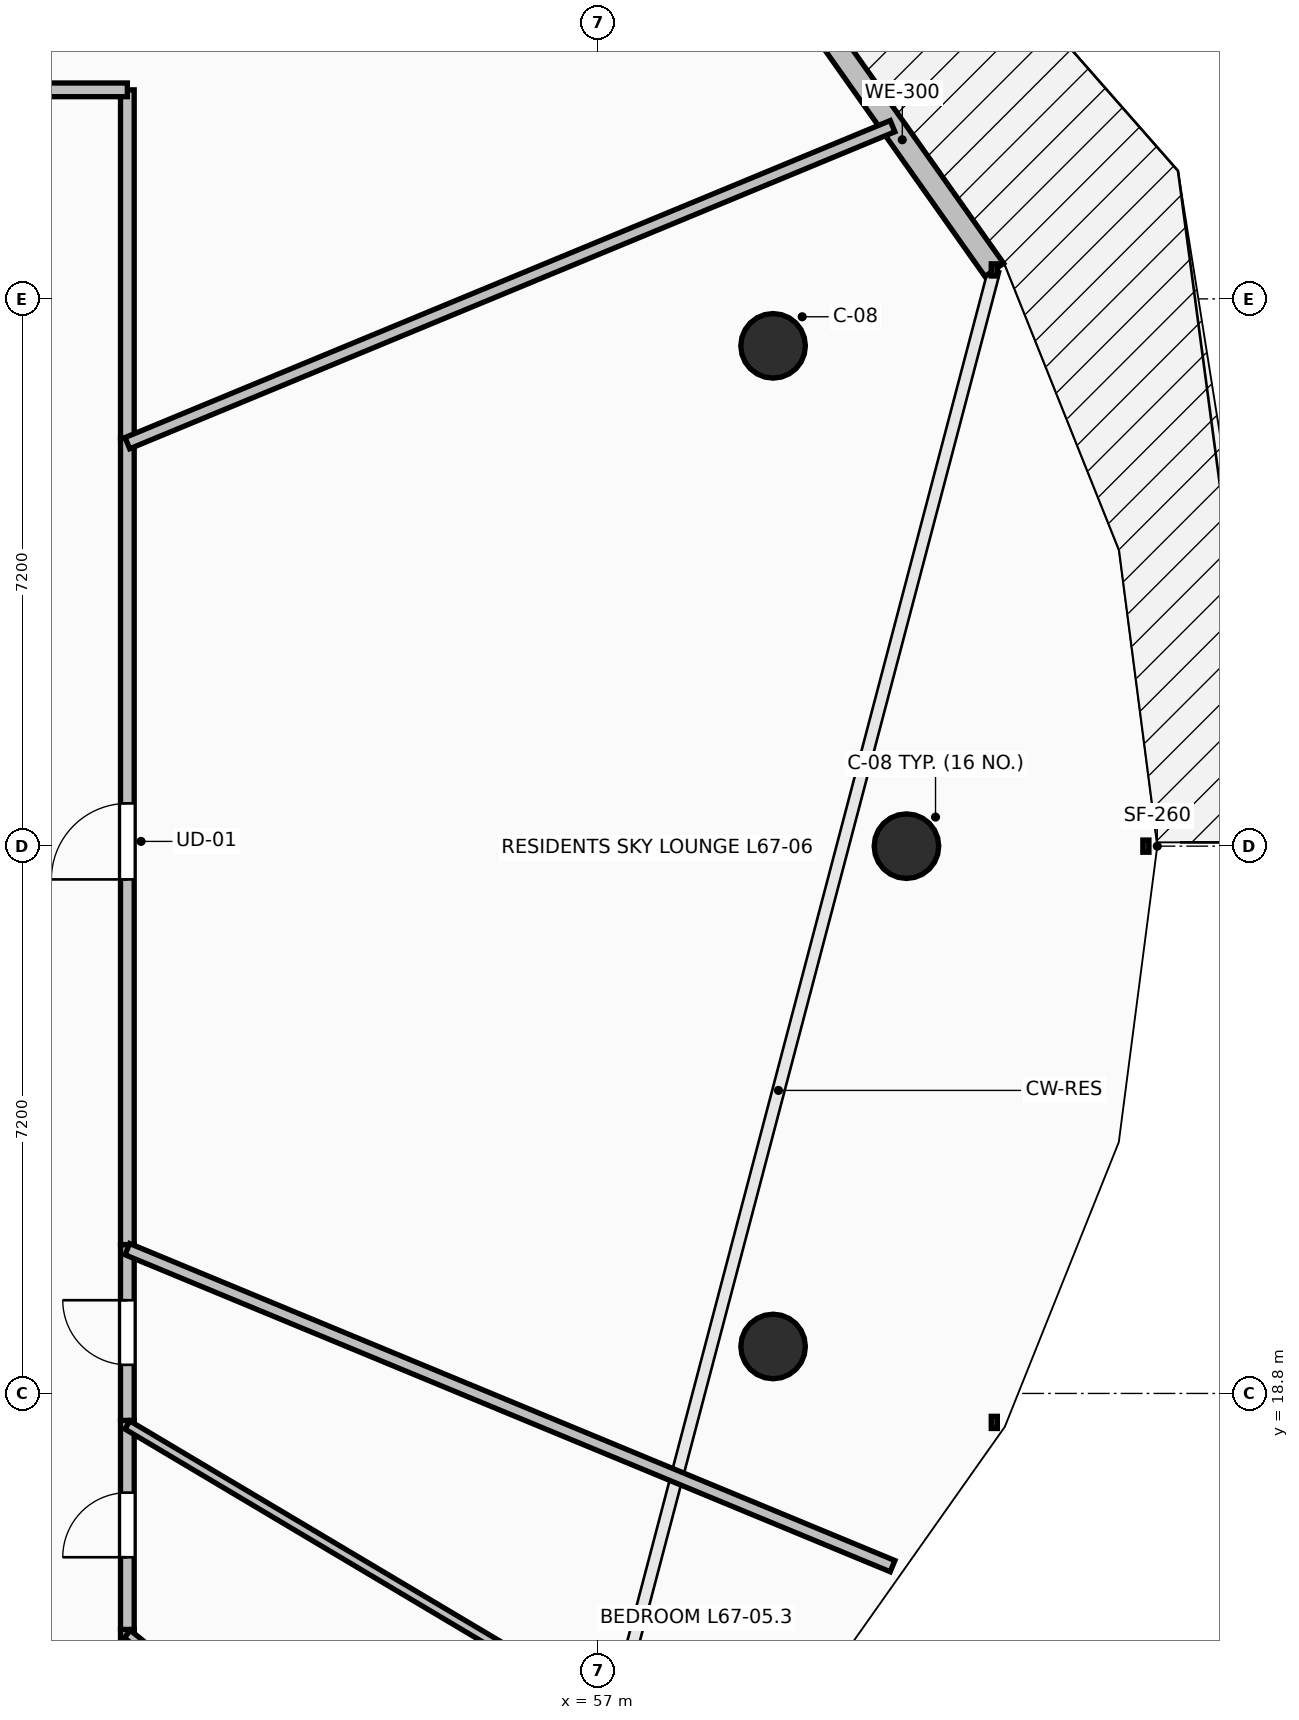
"""IFC4 building model, lengths in metres.
Left out: names, types, materials, properties, quantities, classifications, styles, units other than length and angle.
Written with IfcOpenShell. Run it as: python <this file> out.ifc"""

import sys

from ifc_helpers import new_model, si_unit, direction, frame, frame_2d, origin, origin_2d, place, context, subcontext, project, spatial, rectangle, circle, extrude, element, fill, save


model = new_model("IFC4")
c1 = context("Model", 3, precision=1e-05, world=origin(), true_north=direction((0.0, 1.0)))
c2 = subcontext(c1, "Body", "Model", "MODEL_VIEW")
j1 = project(units=[si_unit("LENGTHUNIT", "METRE"), si_unit("PLANEANGLEUNIT", "RADIAN")], contexts=[c1])
p1 = place(None, origin())
s1 = spatial("IfcSite", under=j1, at=p1, CompositionType="ELEMENT")
p2 = place(p1, origin())
s2 = spatial("IfcBuilding", under=s1, at=p2, CompositionType="ELEMENT")
p3 = place(p2, frame((0.0, 0.0, 248.45)))
s3 = spatial("IfcBuildingStorey", under=s2, at=p3, CompositionType="ELEMENT", Elevation=248.45)
for number, where, z_axis, x_axis in (
    (1, (61.05, 26.0, 0.0), (0.0, 0.0, 1.0), (1.0, 0.0, 0.0)),
    (2, (59.295, 32.582, 0.0), (0.0, 0.0, 1.0), (0.924, 0.383, 0.0)),
    (3, (59.295, 19.418, 0.0), (0.0, 0.0, 1.0), (0.924, -0.383, 0.0)),
):
    element("IfcColumn", number, at=place(p3, frame(where, z_axis=z_axis, x_axis=x_axis)), inside=s3, PredefinedType="COLUMN", context=c2, shape_type="SweptSolid", body=[
        extrude(circle(Radius=0.425, at=origin_2d()), origin(), (0.0, 0.0, 1.0), 3.55),
    ])
p4 = place(p3, frame((62.206, 33.581, 0.0), z_axis=(0.0, 0.0, 1.0), x_axis=(-0.577261247247, 0.816559521668, 0.0)))
e4 = element("IfcWall", 4, at=p4, inside=s3, PredefinedType="STANDARD", context=c2, shape_type="SweptSolid", body=[
    extrude(rectangle(XDim=4.194, YDim=0.3, at=frame_2d((2.097, 0.0))), origin(), (0.0, 0.0, 1.0), 3.29),
])
p5 = place(p3, frame((50.8, 14.05, 0.0), z_axis=(0.0, 0.0, 1.0), x_axis=(0.0, 1.0, 0.0)))
e5 = element("IfcWall", 5, at=p5, inside=s3, PredefinedType="PARTITIONING", context=c2, shape_type="SweptSolid", body=[
    extrude(rectangle(XDim=1.645, YDim=0.18, at=frame_2d((0.823, 0.0))), origin(), (0.0, 0.0, 1.0), 2.482),
])
p6 = place(p3, frame((50.8, 15.695, 0.0), z_axis=(0.0, 0.0, 1.0), x_axis=(0.0, 1.0, 0.0)))
e6 = element("IfcWall", 6, at=p6, inside=s3, PredefinedType="PARTITIONING", context=c2, shape_type="SweptSolid", body=[
    extrude(rectangle(XDim=2.75, YDim=0.18, at=frame_2d((1.375, 0.0))), origin(), (0.0, 0.0, 1.0), 2.482),
])
p7 = place(p6, frame((0.95, 0.0, 0.0)))
e7 = element("IfcOpeningElement", 7, at=p7, cuts=e6, PredefinedType="OPENING", context=c2, shape_type="SweptSolid", body=[
    extrude(rectangle(XDim=0.85, YDim=2.1, at=frame_2d((0.425, 1.05))), frame((0.0, 0.105, 0.0), z_axis=(0.0, -1.0, 0.0), x_axis=(1.0, 0.0, 0.0)), (0.0, 0.0, 1.0), 0.21),
])
p8 = place(p3, frame((50.8, 18.445, 0.0), z_axis=(0.0, 0.0, 1.0), x_axis=(0.0, 1.0, 0.0)))
e8 = element("IfcWall", 8, at=p8, inside=s3, PredefinedType="PARTITIONING", context=c2, shape_type="SweptSolid", body=[
    extrude(rectangle(XDim=2.313, YDim=0.18, at=frame_2d((1.156, 0.0))), origin(), (0.0, 0.0, 1.0), 3.022),
])
p9 = place(p8, frame((0.731, 0.0, 0.0)))
e9 = element("IfcOpeningElement", 9, at=p9, cuts=e8, PredefinedType="OPENING", context=c2, shape_type="SweptSolid", body=[
    extrude(rectangle(XDim=0.85, YDim=2.1, at=frame_2d((0.425, 1.05))), frame((0.0, 0.105, 0.0), z_axis=(0.0, -1.0, 0.0), x_axis=(1.0, 0.0, 0.0)), (0.0, 0.0, 1.0), 0.21),
])
p10 = place(p3, frame((50.8, 20.758, 0.0), z_axis=(0.0, 0.0, 1.0), x_axis=(0.0, 1.0, 0.0)))
e10 = element("IfcWall", 10, at=p10, inside=s3, PredefinedType="PARTITIONING", context=c2, shape_type="SweptSolid", body=[
    extrude(rectangle(XDim=10.609, YDim=0.18, at=frame_2d((5.304, 0.0))), origin(), (0.0, 0.0, 1.0), 2.482),
])
p11 = place(p10, frame((4.804, 0.0, 0.0)))
e11 = element("IfcOpeningElement", 11, at=p11, cuts=e10, PredefinedType="OPENING", context=c2, shape_type="SweptSolid", body=[
    extrude(rectangle(XDim=1.0, YDim=2.15, at=frame_2d((0.5, 1.075))), frame((0.0, 0.105, 0.0), z_axis=(0.0, -1.0, 0.0), x_axis=(1.0, 0.0, 0.0)), (0.0, 0.0, 1.0), 0.21),
])
p12 = place(p3, frame((50.8, 31.367, 0.0), z_axis=(0.0, 0.0, 1.0), x_axis=(0.0, 1.0, 0.0)))
e12 = element("IfcWall", 12, at=p12, inside=s3, PredefinedType="PARTITIONING", context=c2, shape_type="SweptSolid", body=[
    extrude(rectangle(XDim=4.583, YDim=0.18, at=frame_2d((2.292, 0.0))), origin(), (0.0, 0.0, 1.0), 2.482),
])
p13 = place(p3, frame((50.8, 35.95, 0.0), z_axis=(0.0, 0.0, 1.0), x_axis=(-1.0, 0.0, 0.0)))
e13 = element("IfcWall", 13, at=p13, inside=s3, PredefinedType="PARTITIONING", context=c2, shape_type="SweptSolid", body=[
    extrude(rectangle(XDim=8.739, YDim=0.18, at=frame_2d((4.37, 0.0))), origin(), (0.0, 0.0, 1.0), 2.482),
])
p14 = place(p13, frame((3.869, 0.0, 0.0)))
e14 = element("IfcOpeningElement", 14, at=p14, cuts=e13, PredefinedType="OPENING", context=c2, shape_type="SweptSolid", body=[
    extrude(rectangle(XDim=1.0, YDim=2.15, at=frame_2d((0.5, 1.075))), frame((0.0, 0.105, 0.0), z_axis=(0.0, -1.0, 0.0), x_axis=(1.0, 0.0, 0.0)), (0.0, 0.0, 1.0), 0.21),
])
p15 = place(p3, frame((55.828, 11.563, 0.0), z_axis=(0.0, 0.0, 1.0), x_axis=(-0.777103372697, 0.62937298015, 0.0)))
e15 = element("IfcWall", 15, at=p15, inside=s3, PredefinedType="PARTITIONING", context=c2, shape_type="SweptSolid", body=[
    extrude(rectangle(XDim=6.47, YDim=0.125, at=frame_2d((3.235, 0.0))), origin(), (0.0, 0.0, 1.0), 2.482),
])
p16 = place(p3, frame((58.493, 13.808, 0.0), z_axis=(0.0, 0.0, 1.0), x_axis=(-0.859400180079, 0.511303560011, 0.0)))
e16 = element("IfcWall", 16, at=p16, inside=s3, PredefinedType="PARTITIONING", context=c2, shape_type="SweptSolid", body=[
    extrude(rectangle(XDim=8.951, YDim=0.125, at=frame_2d((4.476, 0.0))), origin(), (0.0, 0.0, 1.0), 2.874),
])
p17 = place(p3, frame((60.867, 16.528, 0.0), z_axis=(0.0, 0.0, 1.0), x_axis=(-0.923877013663, 0.382689513347, 0.0)))
e17 = element("IfcWall", 17, at=p17, inside=s3, PredefinedType="PARTITIONING", context=c2, shape_type="SweptSolid", body=[
    extrude(rectangle(XDim=10.896, YDim=0.16, at=frame_2d((5.448, 0.0))), origin(), (0.0, 0.0, 1.0), 2.874),
])
p18 = place(p3, frame((60.867, 35.472, 0.0), z_axis=(0.0, 0.0, 1.0), x_axis=(-0.923877013663, -0.382689513347, 0.0)))
e18 = element("IfcWall", 18, at=p18, inside=s3, PredefinedType="PARTITIONING", context=c2, shape_type="SweptSolid", body=[
    extrude(rectangle(XDim=10.896, YDim=0.16, at=frame_2d((5.448, 0.0))), origin(), (0.0, 0.0, 1.0), 2.482),
])
p19 = place(p11, origin())
e19 = element("IfcDoor", 19, at=p19, inside=s3, OperationType="SINGLE_SWING_LEFT", PredefinedType="DOOR", context=c2, shape_type="SweptSolid", body=[
    extrude(rectangle(XDim=1.0, YDim=2.15, at=frame_2d((0.5, 1.075))), frame((0.0, 0.025, 0.0), z_axis=(0.0, -1.0, 0.0), x_axis=(1.0, 0.0, 0.0)), (0.0, 0.0, 1.0), 0.05),
])
fill(e11, e19)
p20 = place(p7, origin())
e20 = element("IfcDoor", 20, at=p20, inside=s3, OperationType="SINGLE_SWING_LEFT", PredefinedType="DOOR", context=c2, shape_type="SweptSolid", body=[
    extrude(rectangle(XDim=0.85, YDim=2.1, at=frame_2d((0.425, 1.05))), frame((0.0, 0.025, 0.0), z_axis=(0.0, -1.0, 0.0), x_axis=(1.0, 0.0, 0.0)), (0.0, 0.0, 1.0), 0.05),
])
fill(e7, e20)
p21 = place(p9, origin())
e21 = element("IfcDoor", 21, at=p21, inside=s3, OperationType="SINGLE_SWING_RIGHT", PredefinedType="DOOR", context=c2, shape_type="SweptSolid", body=[
    extrude(rectangle(XDim=0.85, YDim=2.1, at=frame_2d((0.425, 1.05))), frame((0.0, 0.025, 0.0), z_axis=(0.0, -1.0, 0.0), x_axis=(1.0, 0.0, 0.0)), (0.0, 0.0, 1.0), 0.05),
])
fill(e9, e21)
save(model, sys.argv[1])
